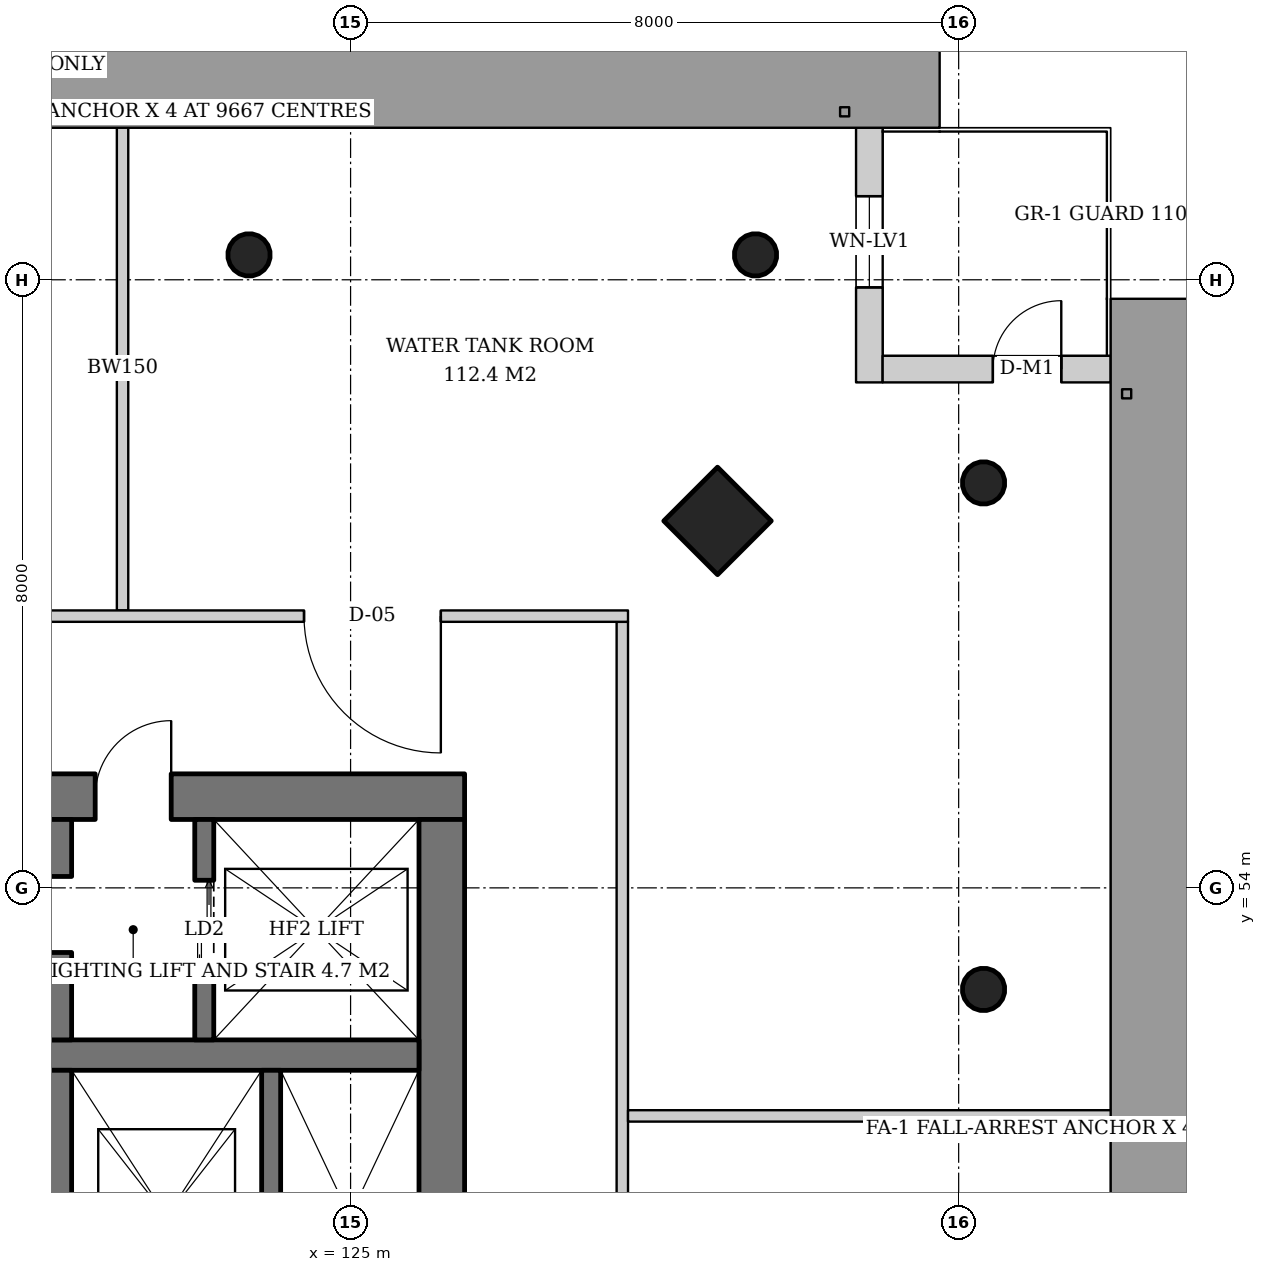
"""IFC4 building model, lengths in metres.
Left out: names, types, materials, properties, quantities, classifications, styles, units other than length and angle.
Written with IfcOpenShell. Run it as: python <this file> out.ifc"""

import sys

from ifc_helpers import new_model, si_unit, direction, frame, frame_2d, origin, origin_2d, place, context, subcontext, project, spatial, rectangle, hollow_circle, extrude, element, fill, save


model = new_model("IFC4")
c1 = context("Model", 3, precision=1e-05, world=origin(), true_north=direction((0.0, 1.0)))
c2 = subcontext(c1, "Body", "Model", "MODEL_VIEW")
j1 = project(units=[si_unit("LENGTHUNIT", "METRE"), si_unit("PLANEANGLEUNIT", "RADIAN")], contexts=[c1])
p1 = place(None, origin())
s1 = spatial("IfcSite", under=j1, at=p1, CompositionType="ELEMENT")
p2 = place(p1, origin())
s2 = spatial("IfcBuilding", under=s1, at=p2, CompositionType="ELEMENT")
p3 = place(p2, frame((0.0, 0.0, 81.8)))
s3 = spatial("IfcBuildingStorey", under=s2, at=p3, CompositionType="ELEMENT", Elevation=81.8)
p4 = place(p3, frame((129.879, 58.879, 0.0), z_axis=(-0.043029647111, -0.043029647111, 0.998146732169), x_axis=(0.707106781187, -0.707106781187, 0.0)))
e1 = element("IfcColumn", 1, at=p4, inside=s3, PredefinedType="COLUMN", context=c2, shape_type="SweptSolid", body=[
    extrude(rectangle(XDim=1.0, YDim=1.0, at=origin_2d()), origin(), (0.0, 0.0, 1.0), 3.807),
])
p5 = place(p3, frame((133.379, 59.379, 0.0), z_axis=(-0.043029647111, -0.043029647111, 0.998146732169), x_axis=(0.707106781187, -0.707106781187, 0.0)))
e2 = element("IfcColumn", 2, at=p5, inside=s3, PredefinedType="COLUMN", context=c2, shape_type="SweptSolid", body=[
    extrude(hollow_circle(Radius=0.28, WallThickness=0.02, at=origin_2d()), origin(), (0.0, 0.0, 1.0), 3.807),
])
p6 = place(p3, frame((133.379, 52.69, 0.0), z_axis=(-0.043059525333, -0.021561848751, 0.998839808957), x_axis=(0.44774654769, -0.894160516368, 0.0)))
e3 = element("IfcColumn", 3, at=p6, inside=s3, PredefinedType="COLUMN", context=c2, shape_type="SweptSolid", body=[
    extrude(hollow_circle(Radius=0.28, WallThickness=0.02, at=origin_2d()), origin(), (0.0, 0.0, 1.0), 3.804),
])
p7 = place(p3, frame((130.379, 62.379, 0.0), z_axis=(-0.043029647111, -0.043029647111, 0.998146732169), x_axis=(0.707106781187, -0.707106781187, 0.0)))
e4 = element("IfcColumn", 4, at=p7, inside=s3, PredefinedType="COLUMN", context=c2, shape_type="SweptSolid", body=[
    extrude(hollow_circle(Radius=0.28, WallThickness=0.02, at=origin_2d()), origin(), (0.0, 0.0, 1.0), 3.807),
])
p8 = place(p3, frame((123.69, 62.379, 0.0), z_axis=(-0.021561848751, -0.043059525333, 0.998839808957), x_axis=(0.894160516368, -0.44774654769, 0.0)))
e5 = element("IfcColumn", 5, at=p8, inside=s3, PredefinedType="COLUMN", context=c2, shape_type="SweptSolid", body=[
    extrude(hollow_circle(Radius=0.28, WallThickness=0.02, at=origin_2d()), origin(), (0.0, 0.0, 1.0), 3.804),
])
p9 = place(p3, frame((107.5, 55.2, 0.0), z_axis=(0.0, 0.0, 1.0), x_axis=(1.0, 0.0, 0.0)))
e6 = element("IfcWall", 6, at=p9, inside=s3, PredefinedType="SHEAR", context=c2, shape_type="SweptSolid", body=[
    extrude(rectangle(XDim=19.0, YDim=0.6, at=frame_2d((9.5, 0.0))), origin(), (0.0, 0.0, 1.0), 3.8),
])
p10 = place(p9, frame((14.14, 0.0, 0.0)))
e7 = element("IfcOpeningElement", 7, at=p10, cuts=e6, PredefinedType="OPENING", context=c2, shape_type="SweptSolid", body=[
    extrude(rectangle(XDim=1.0, YDim=2.1, at=frame_2d((0.5, 1.05))), frame((0.0, 0.31, 0.0), z_axis=(0.0, -1.0, 0.0), x_axis=(1.0, 0.0, 0.0)), (0.0, 0.0, 1.0), 0.62),
])
p11 = place(p9, frame((1.675, 0.0, 0.0)))
e8 = element("IfcOpeningElement", 8, at=p11, cuts=e6, PredefinedType="OPENING", context=c2, shape_type="SweptSolid", body=[
    extrude(rectangle(XDim=1.0, YDim=2.1, at=frame_2d((0.5, 1.05))), frame((0.0, 0.31, 0.0), z_axis=(0.0, -1.0, 0.0), x_axis=(1.0, 0.0, 0.0)), (0.0, 0.0, 1.0), 0.62),
])
p12 = place(p9, frame((3.587, 0.0, 0.0)))
e9 = element("IfcOpeningElement", 9, at=p12, cuts=e6, PredefinedType="OPENING", context=c2, shape_type="SweptSolid", body=[
    extrude(rectangle(XDim=1.0, YDim=2.1, at=frame_2d((0.5, 1.05))), frame((0.0, 0.31, 0.0), z_axis=(0.0, -1.0, 0.0), x_axis=(1.0, 0.0, 0.0)), (0.0, 0.0, 1.0), 0.62),
])
p13 = place(p3, frame((126.2, 37.1, 0.0), z_axis=(0.0, 0.0, 1.0), x_axis=(0.0, 1.0, 0.0)))
e10 = element("IfcWall", 10, at=p13, inside=s3, PredefinedType="SHEAR", context=c2, shape_type="SweptSolid", body=[
    extrude(rectangle(XDim=17.8, YDim=0.6, at=frame_2d((8.9, 0.0))), origin(), (0.0, 0.0, 1.0), 3.8),
])
p14 = place(p13, frame((8.0, 0.0, 0.0)))
e11 = element("IfcOpeningElement", 11, at=p14, cuts=e10, PredefinedType="OPENING", context=c2, shape_type="SweptSolid", body=[
    extrude(rectangle(XDim=1.8, YDim=2.4, at=frame_2d((0.9, 1.2))), frame((0.0, 0.31, 0.0), z_axis=(0.0, -1.0, 0.0), x_axis=(1.0, 0.0, 0.0)), (0.0, 0.0, 1.0), 0.62),
])
p15 = place(p3, frame((108.1, 51.8, 0.0), z_axis=(0.0, 0.0, 1.0), x_axis=(1.0, 0.0, 0.0)))
e12 = element("IfcWall", 12, at=p15, inside=s3, PredefinedType="SHEAR", context=c2, shape_type="SweptSolid", body=[
    extrude(rectangle(XDim=17.8, YDim=0.4, at=frame_2d((8.9, 0.0))), origin(), (0.0, 0.0, 1.0), 3.8),
])
p16 = place(p15, frame((11.33, 0.0, 0.0)))
e13 = element("IfcOpeningElement", 13, at=p16, cuts=e12, PredefinedType="OPENING", context=c2, shape_type="SweptSolid", body=[
    extrude(rectangle(XDim=1.0, YDim=2.1, at=frame_2d((0.5, 1.05))), frame((0.0, 0.21, 0.0), z_axis=(0.0, -1.0, 0.0), x_axis=(1.0, 0.0, 0.0)), (0.0, 0.0, 1.0), 0.42),
])
p17 = place(p3, frame((121.13, 40.4, 0.0), z_axis=(0.0, 0.0, 1.0), x_axis=(0.0, 1.0, 0.0)))
e14 = element("IfcWall", 14, at=p17, inside=s3, PredefinedType="SHEAR", context=c2, shape_type="SweptSolid", body=[
    extrude(rectangle(XDim=11.2, YDim=0.4, at=frame_2d((5.6, 0.0))), origin(), (0.0, 0.0, 1.0), 3.8),
])
p18 = place(p17, frame((5.1, 0.0, 0.0)))
e15 = element("IfcOpeningElement", 15, at=p18, cuts=e14, PredefinedType="OPENING", context=c2, shape_type="SweptSolid", body=[
    extrude(rectangle(XDim=1.0, YDim=2.1, at=frame_2d((0.5, 1.05))), frame((0.0, 0.21, 0.0), z_axis=(0.0, -1.0, 0.0), x_axis=(1.0, 0.0, 0.0)), (0.0, 0.0, 1.0), 0.42),
])
p19 = place(p3, frame((121.13, 52.0, 0.0), z_axis=(0.0, 0.0, 1.0), x_axis=(0.0, 1.0, 0.0)))
e16 = element("IfcWall", 16, at=p19, inside=s3, PredefinedType="SHEAR", context=c2, shape_type="SweptSolid", body=[
    extrude(rectangle(XDim=2.9, YDim=0.4, at=frame_2d((1.45, 0.0))), origin(), (0.0, 0.0, 1.0), 3.8),
])
p20 = place(p19, frame((1.15, 0.0, 0.0)))
e17 = element("IfcOpeningElement", 17, at=p20, cuts=e16, PredefinedType="OPENING", context=c2, shape_type="SweptSolid", body=[
    extrude(rectangle(XDim=1.0, YDim=2.1, at=frame_2d((0.5, 1.05))), frame((0.0, 0.21, 0.0), z_axis=(0.0, -1.0, 0.0), x_axis=(1.0, 0.0, 0.0)), (0.0, 0.0, 1.0), 0.42),
])
p21 = place(p3, frame((131.825, 64.0, 0.0), z_axis=(0.0, 0.0, 1.0), x_axis=(0.0, -1.0, 0.0)))
e18 = element("IfcWall", 18, at=p21, inside=s3, PredefinedType="SOLIDWALL", context=c2, shape_type="SweptSolid", body=[
    extrude(rectangle(XDim=3.35, YDim=0.35, at=frame_2d((1.675, 0.0))), origin(), (0.0, 0.0, 1.0), 3.52),
])
p22 = place(p21, frame((0.9, 0.0, 0.6)))
e19 = element("IfcOpeningElement", 19, at=p22, cuts=e18, PredefinedType="OPENING", context=c2, shape_type="SweptSolid", body=[
    extrude(rectangle(XDim=1.2, YDim=2.55, at=frame_2d((0.6, 1.275))), frame((0.0, 0.185, 0.0), z_axis=(0.0, -1.0, 0.0), x_axis=(1.0, 0.0, 0.0)), (0.0, 0.0, 1.0), 0.37),
])
p23 = place(p3, frame((132.0, 60.825, 0.0), z_axis=(0.0, 0.0, 1.0), x_axis=(1.0, 0.0, 0.0)))
e20 = element("IfcWall", 20, at=p23, inside=s3, PredefinedType="SOLIDWALL", context=c2, shape_type="SweptSolid", body=[
    extrude(rectangle(XDim=3.0, YDim=0.35, at=frame_2d((1.5, 0.0))), origin(), (0.0, 0.0, 1.0), 3.52),
])
p24 = place(p23, frame((1.45, 0.0, 0.0)))
e21 = element("IfcOpeningElement", 21, at=p24, cuts=e20, PredefinedType="OPENING", context=c2, shape_type="SweptSolid", body=[
    extrude(rectangle(XDim=0.9, YDim=2.1, at=frame_2d((0.45, 1.05))), frame((0.0, 0.185, 0.0), z_axis=(0.0, -1.0, 0.0), x_axis=(1.0, 0.0, 0.0)), (0.0, 0.0, 1.0), 0.37),
])
p25 = place(p3, frame((123.075, 52.0, 0.0), z_axis=(0.0, 0.0, 1.0), x_axis=(0.0, 1.0, 0.0)))
e22 = element("IfcWall", 22, at=p25, inside=s3, PredefinedType="SHEAR", context=c2, shape_type="SweptSolid", body=[
    extrude(rectangle(XDim=2.9, YDim=0.25, at=frame_2d((1.45, 0.0))), origin(), (0.0, 0.0, 1.0), 3.8),
])
p26 = place(p25, frame((0.8, 0.0, 0.0)))
e23 = element("IfcOpeningElement", 23, at=p26, cuts=e22, PredefinedType="OPENING", context=c2, shape_type="SweptSolid", body=[
    extrude(rectangle(XDim=1.3, YDim=2.2, at=frame_2d((0.65, 1.1))), frame((0.0, 0.135, 0.0), z_axis=(0.0, -1.0, 0.0), x_axis=(1.0, 0.0, 0.0)), (0.0, 0.0, 1.0), 0.27),
])
p27 = place(p3, frame((123.955, 47.75, 0.0), z_axis=(0.0, 0.0, 1.0), x_axis=(0.0, 1.0, 0.0)))
e24 = element("IfcWall", 24, at=p27, inside=s3, PredefinedType="SHEAR", context=c2, shape_type="SweptSolid", body=[
    extrude(rectangle(XDim=3.85, YDim=0.25, at=frame_2d((1.925, 0.0))), origin(), (0.0, 0.0, 1.0), 3.8),
])
p28 = place(p3, frame((128.575, 34.35, 0.0), z_axis=(0.0, 0.0, 1.0), x_axis=(0.0, 1.0, 0.0)))
e25 = element("IfcWall", 25, at=p28, inside=s3, PredefinedType="PARTITIONING", context=c2, shape_type="SweptSolid", body=[
    extrude(rectangle(XDim=23.15, YDim=0.15, at=frame_2d((11.575, 0.0))), origin(), (0.0, 0.0, 1.0), 2.82),
])
p29 = place(p28, frame((7.462, 0.0, 0.0)))
e26 = element("IfcOpeningElement", 26, at=p29, cuts=e25, PredefinedType="OPENING", context=c2, shape_type="SweptSolid", body=[
    extrude(rectangle(XDim=1.8, YDim=2.4, at=frame_2d((0.9, 1.2))), frame((0.0, 0.085, 0.0), z_axis=(0.0, -1.0, 0.0), x_axis=(1.0, 0.0, 0.0)), (0.0, 0.0, 1.0), 0.17),
])
p30 = place(p3, frame((128.65, 51.0, 0.0), z_axis=(0.0, 0.0, 1.0), x_axis=(1.0, 0.0, 0.0)))
e27 = element("IfcWall", 27, at=p30, inside=s3, PredefinedType="PARTITIONING", context=c2, shape_type="SweptSolid", body=[
    extrude(rectangle(XDim=6.39, YDim=0.15, at=frame_2d((3.195, 0.0))), origin(), (0.0, 0.0, 1.0), 3.12),
])
p31 = place(p3, frame((122.0, 57.65, 0.0), z_axis=(0.0, 0.0, 1.0), x_axis=(0.0, 1.0, 0.0)))
e28 = element("IfcWall", 28, at=p31, inside=s3, PredefinedType="SOLIDWALL", context=c2, shape_type="SweptSolid", body=[
    extrude(rectangle(XDim=6.39, YDim=0.15, at=frame_2d((3.195, 0.0))), origin(), (0.0, 0.0, 1.0), 2.92),
])
p32 = place(p3, frame((128.65, 57.575, 0.0), z_axis=(0.0, 0.0, 1.0), x_axis=(-1.0, 0.0, 0.0)))
e29 = element("IfcWall", 29, at=p32, inside=s3, PredefinedType="PARTITIONING", context=c2, shape_type="SweptSolid", body=[
    extrude(rectangle(XDim=23.15, YDim=0.15, at=frame_2d((11.575, 0.0))), origin(), (0.0, 0.0, 1.0), 2.82),
])
p33 = place(p32, frame((2.462, 0.0, 0.0)))
e30 = element("IfcOpeningElement", 30, at=p33, cuts=e29, PredefinedType="OPENING", context=c2, shape_type="SweptSolid", body=[
    extrude(rectangle(XDim=1.8, YDim=2.4, at=frame_2d((0.9, 1.2))), frame((0.0, 0.085, 0.0), z_axis=(0.0, -1.0, 0.0), x_axis=(1.0, 0.0, 0.0)), (0.0, 0.0, 1.0), 0.17),
])
p34 = place(p32, frame((10.75, 0.0, 0.0)))
e31 = element("IfcOpeningElement", 31, at=p34, cuts=e29, PredefinedType="OPENING", context=c2, shape_type="SweptSolid", body=[
    extrude(rectangle(XDim=1.8, YDim=2.4, at=frame_2d((0.9, 1.2))), frame((0.0, 0.085, 0.0), z_axis=(0.0, -1.0, 0.0), x_axis=(1.0, 0.0, 0.0)), (0.0, 0.0, 1.0), 0.17),
])
p35 = place(p22, origin())
e32 = element("IfcWindow", 32, at=p35, inside=s3, PartitioningType="SINGLE_PANEL", PredefinedType="USERDEFINED", context=c2, shape_type="SweptSolid", body=[
    extrude(rectangle(XDim=1.2, YDim=2.55, at=frame_2d((0.6, 1.275))), frame((0.0, 0.03, 0.0), z_axis=(0.0, -1.0, 0.0), x_axis=(1.0, 0.0, 0.0)), (0.0, 0.0, 1.0), 0.06),
])
fill(e19, e32)
p36 = place(p24, origin())
e33 = element("IfcDoor", 33, at=p36, inside=s3, OperationType="SINGLE_SWING_RIGHT", PredefinedType="DOOR", context=c2, shape_type="SweptSolid", body=[
    extrude(rectangle(XDim=0.9, YDim=2.1, at=frame_2d((0.45, 1.05))), frame((0.0, 0.025, 0.0), z_axis=(0.0, -1.0, 0.0), x_axis=(1.0, 0.0, 0.0)), (0.0, 0.0, 1.0), 0.05),
])
fill(e21, e33)
p37 = place(p26, origin())
e34 = element("IfcDoor", 34, at=p37, inside=s3, OperationType="DOUBLE_DOOR_SLIDING", PredefinedType="DOOR", context=c2, shape_type="SweptSolid", body=[
    extrude(rectangle(XDim=1.3, YDim=2.2, at=frame_2d((0.65, 1.1))), frame((0.0, 0.025, 0.0), z_axis=(0.0, -1.0, 0.0), x_axis=(1.0, 0.0, 0.0)), (0.0, 0.0, 1.0), 0.05),
])
fill(e23, e34)
p38 = place(p20, origin())
e35 = element("IfcDoor", 35, at=p38, inside=s3, OperationType="SINGLE_SWING_RIGHT", PredefinedType="DOOR", context=c2, shape_type="SweptSolid", body=[
    extrude(rectangle(XDim=1.0, YDim=2.1, at=frame_2d((0.5, 1.05))), frame((0.0, 0.025, 0.0), z_axis=(0.0, -1.0, 0.0), x_axis=(1.0, 0.0, 0.0)), (0.0, 0.0, 1.0), 0.05),
])
fill(e17, e35)
p39 = place(p10, origin())
e36 = element("IfcDoor", 36, at=p39, inside=s3, OperationType="SINGLE_SWING_RIGHT", PredefinedType="DOOR", context=c2, shape_type="SweptSolid", body=[
    extrude(rectangle(XDim=1.0, YDim=2.1, at=frame_2d((0.5, 1.05))), frame((0.0, 0.025, 0.0), z_axis=(0.0, -1.0, 0.0), x_axis=(1.0, 0.0, 0.0)), (0.0, 0.0, 1.0), 0.05),
])
fill(e7, e36)
p40 = place(p33, origin())
e37 = element("IfcDoor", 37, at=p40, inside=s3, OperationType="DOUBLE_DOOR_SINGLE_SWING", PredefinedType="DOOR", context=c2, shape_type="SweptSolid", body=[
    extrude(rectangle(XDim=1.8, YDim=2.4, at=frame_2d((0.9, 1.2))), frame((0.0, 0.025, 0.0), z_axis=(0.0, -1.0, 0.0), x_axis=(1.0, 0.0, 0.0)), (0.0, 0.0, 1.0), 0.05),
])
fill(e30, e37)
save(model, sys.argv[1])
